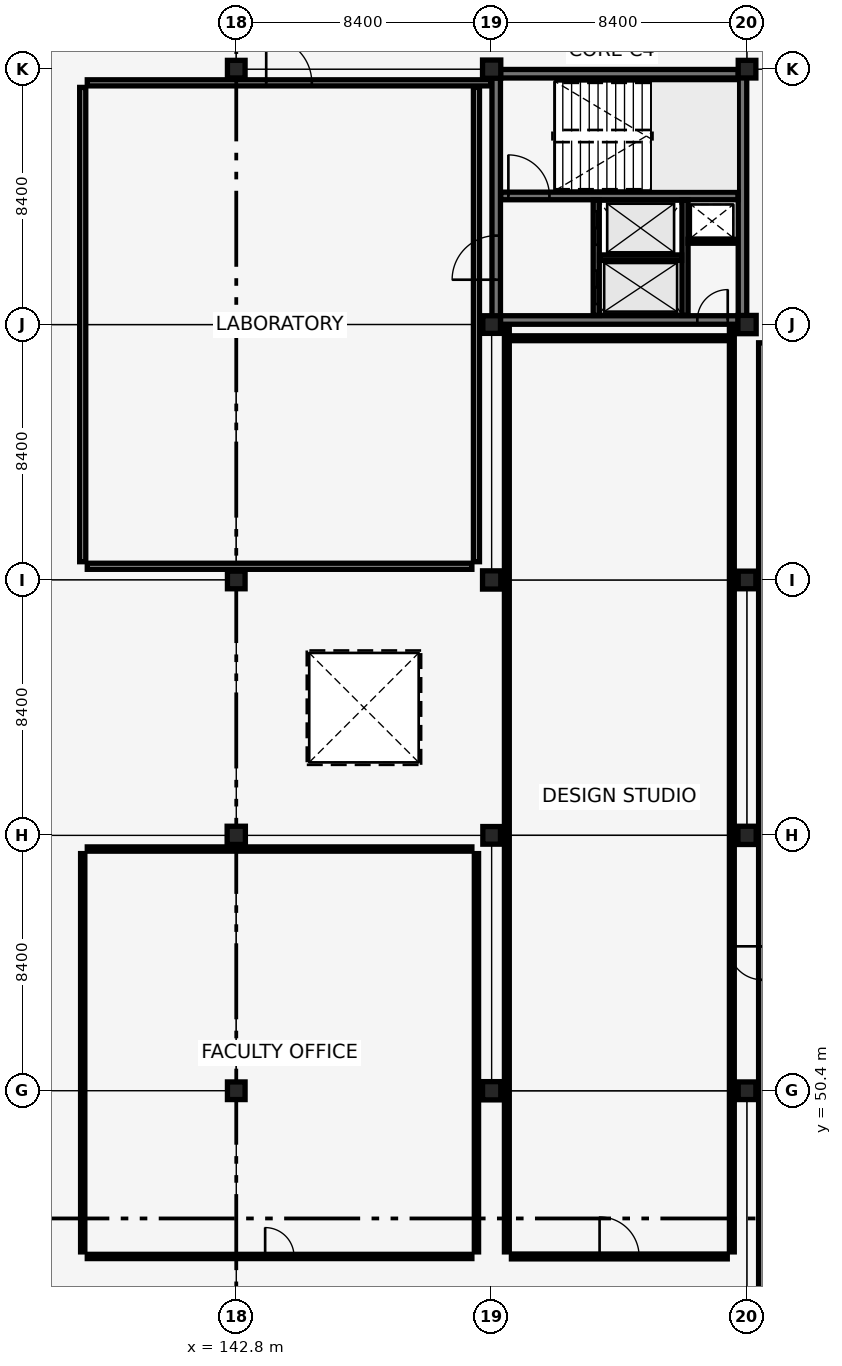
"""IFC4 building model, lengths in metres.
Left out: names, types, materials, properties, quantities, classifications, styles, units other than length and angle.
Written with IfcOpenShell. Run it as: python <this file> out.ifc"""

import sys

from ifc_helpers import new_model, si_unit, direction, frame, frame_2d, origin, origin_2d, place, context, subcontext, project, spatial, rectangle, extrude, element, fill, save


model = new_model("IFC4")
c1 = context("Model", 3, precision=1e-05, world=origin(), true_north=direction((0.0, 1.0)))
c2 = subcontext(c1, "Body", "Model", "MODEL_VIEW")
j1 = project(units=[si_unit("LENGTHUNIT", "METRE"), si_unit("PLANEANGLEUNIT", "RADIAN")], contexts=[c1])
p1 = place(None, origin())
s1 = spatial("IfcSite", under=j1, at=p1, CompositionType="ELEMENT")
p2 = place(p1, origin())
s2 = spatial("IfcBuilding", under=s1, at=p2, CompositionType="ELEMENT")
p3 = place(p2, frame((0.0, 0.0, 18.02)))
s3 = spatial("IfcBuildingStorey", under=s2, at=p3, CompositionType="ELEMENT", Elevation=18.02)
p4 = place(p3, frame((151.35, 75.75, 0.0), z_axis=(0.0, 0.0, 1.0), x_axis=(1.0, 0.0, 0.0)))
e1 = element("IfcWall", 1, at=p4, inside=s3, PredefinedType="SHEAR", context=c2, shape_type="SweptSolid", body=[
    extrude(rectangle(XDim=8.1, YDim=0.28, at=frame_2d((4.05, 0.0))), origin(), (0.0, 0.0, 1.0), 3.78),
])
p5 = place(p4, frame((6.615, 0.0, 0.0)))
e2 = element("IfcOpeningElement", 2, at=p5, cuts=e1, PredefinedType="OPENING", context=c2, shape_type="SweptSolid", body=[
    extrude(rectangle(XDim=1.0, YDim=2.15, at=frame_2d((0.5, 1.075))), frame((0.0, 0.15, 0.0), z_axis=(0.0, -1.0, 0.0), x_axis=(1.0, 0.0, 0.0)), (0.0, 0.0, 1.0), 0.3),
])
p6 = place(p3, frame((151.35, 83.85, 0.0), z_axis=(0.0, 0.0, 1.0), x_axis=(1.0, 0.0, 0.0)))
e3 = element("IfcWall", 3, at=p6, inside=s3, PredefinedType="SHEAR", context=c2, shape_type="SweptSolid", body=[
    extrude(rectangle(XDim=8.1, YDim=0.28, at=frame_2d((4.05, 0.0))), origin(), (0.0, 0.0, 1.0), 3.78),
])
p7 = place(p3, frame((151.35, 75.75, 0.0), z_axis=(0.0, 0.0, 1.0), x_axis=(0.0, 1.0, 0.0)))
e4 = element("IfcWall", 4, at=p7, inside=s3, PredefinedType="SHEAR", context=c2, shape_type="SweptSolid", body=[
    extrude(rectangle(XDim=8.1, YDim=0.28, at=frame_2d((4.05, 0.0))), origin(), (0.0, 0.0, 1.0), 3.78),
])
p8 = place(p7, frame((1.325, 0.0, 0.0)))
e5 = element("IfcOpeningElement", 5, at=p8, cuts=e4, PredefinedType="OPENING", context=c2, shape_type="SweptSolid", body=[
    extrude(rectangle(XDim=1.45, YDim=2.15, at=frame_2d((0.725, 1.075))), frame((0.0, 0.15, 0.0), z_axis=(0.0, -1.0, 0.0), x_axis=(1.0, 0.0, 0.0)), (0.0, 0.0, 1.0), 0.3),
])
p9 = place(p3, frame((159.45, 75.75, 0.0), z_axis=(0.0, 0.0, 1.0), x_axis=(0.0, 1.0, 0.0)))
e6 = element("IfcWall", 6, at=p9, inside=s3, PredefinedType="SHEAR", context=c2, shape_type="SweptSolid", body=[
    extrude(rectangle(XDim=8.1, YDim=0.28, at=frame_2d((4.05, 0.0))), origin(), (0.0, 0.0, 1.0), 3.78),
])
p10 = place(p3, frame((151.5, 79.83, 0.0), z_axis=(0.0, 0.0, 1.0), x_axis=(1.0, 0.0, 0.0)))
e7 = element("IfcWall", 7, at=p10, inside=s3, PredefinedType="SHEAR", context=c2, shape_type="SweptSolid", body=[
    extrude(rectangle(XDim=7.8, YDim=0.25, at=frame_2d((3.9, 0.0))), origin(), (0.0, 0.0, 1.0), 3.78),
])
p11 = place(p10, frame((0.25, 0.0, 0.0)))
e8 = element("IfcOpeningElement", 8, at=p11, cuts=e7, PredefinedType="OPENING", context=c2, shape_type="SweptSolid", body=[
    extrude(rectangle(XDim=1.35, YDim=2.15, at=frame_2d((0.675, 1.075))), frame((0.0, 0.135, 0.0), z_axis=(0.0, -1.0, 0.0), x_axis=(1.0, 0.0, 0.0)), (0.0, 0.0, 1.0), 0.27),
])
p12 = place(p3, frame((142.8, 50.4, 0.0), z_axis=(0.0, 0.0, 1.0), x_axis=(1.0, 0.0, 0.0)))
e9 = element("IfcColumn", 9, at=p12, inside=s3, PredefinedType="COLUMN", context=c2, shape_type="SweptSolid", body=[
    extrude(rectangle(XDim=0.58, YDim=0.58, at=origin_2d()), origin(), (0.0, 0.0, 1.0), 3.78),
])
p13 = place(p3, frame((142.8, 58.8, 0.0), z_axis=(0.0, 0.0, 1.0), x_axis=(1.0, 0.0, 0.0)))
e10 = element("IfcColumn", 10, at=p13, inside=s3, PredefinedType="COLUMN", context=c2, shape_type="SweptSolid", body=[
    extrude(rectangle(XDim=0.6, YDim=0.6, at=origin_2d()), origin(), (0.0, 0.0, 1.0), 3.78),
])
p14 = place(p3, frame((142.8, 67.2, 0.0), z_axis=(0.0, 0.0, 1.0), x_axis=(1.0, 0.0, 0.0)))
e11 = element("IfcColumn", 11, at=p14, inside=s3, PredefinedType="COLUMN", context=c2, shape_type="SweptSolid", body=[
    extrude(rectangle(XDim=0.58, YDim=0.58, at=origin_2d()), origin(), (0.0, 0.0, 1.0), 3.78),
])
p15 = place(p3, frame((142.8, 75.6, 0.0), z_axis=(0.0, 0.0, 1.0), x_axis=(1.0, 0.0, 0.0)))
e12 = element("IfcColumn", 12, at=p15, inside=s3, PredefinedType="COLUMN", context=c2, shape_type="SweptSolid", body=[
    extrude(rectangle(XDim=0.6, YDim=0.6, at=origin_2d()), origin(), (0.0, 0.0, 1.0), 3.78),
])
p16 = place(p3, frame((142.8, 84.0, 0.0), z_axis=(0.0, 0.0, 1.0), x_axis=(1.0, 0.0, 0.0)))
e13 = element("IfcColumn", 13, at=p16, inside=s3, PredefinedType="COLUMN", context=c2, shape_type="SweptSolid", body=[
    extrude(rectangle(XDim=0.58, YDim=0.58, at=origin_2d()), origin(), (0.0, 0.0, 1.0), 3.78),
])
p17 = place(p3, frame((151.2, 50.4, 0.0), z_axis=(0.0, 0.0, 1.0), x_axis=(1.0, 0.0, 0.0)))
e14 = element("IfcColumn", 14, at=p17, inside=s3, PredefinedType="COLUMN", context=c2, shape_type="SweptSolid", body=[
    extrude(rectangle(XDim=0.6, YDim=0.6, at=origin_2d()), origin(), (0.0, 0.0, 1.0), 3.78),
])
p18 = place(p3, frame((151.2, 58.8, 0.0), z_axis=(0.0, 0.0, 1.0), x_axis=(1.0, 0.0, 0.0)))
e15 = element("IfcColumn", 15, at=p18, inside=s3, PredefinedType="COLUMN", context=c2, shape_type="SweptSolid", body=[
    extrude(rectangle(XDim=0.58, YDim=0.58, at=origin_2d()), origin(), (0.0, 0.0, 1.0), 3.78),
])
p19 = place(p3, frame((151.2, 67.2, 0.0), z_axis=(0.0, 0.0, 1.0), x_axis=(1.0, 0.0, 0.0)))
e16 = element("IfcColumn", 16, at=p19, inside=s3, PredefinedType="COLUMN", context=c2, shape_type="SweptSolid", body=[
    extrude(rectangle(XDim=0.6, YDim=0.6, at=origin_2d()), origin(), (0.0, 0.0, 1.0), 3.78),
])
p20 = place(p3, frame((151.2, 75.6, 0.0), z_axis=(0.0, 0.0, 1.0), x_axis=(1.0, 0.0, 0.0)))
e17 = element("IfcColumn", 17, at=p20, inside=s3, PredefinedType="COLUMN", context=c2, shape_type="SweptSolid", body=[
    extrude(rectangle(XDim=0.58, YDim=0.58, at=origin_2d()), origin(), (0.0, 0.0, 1.0), 3.78),
])
p21 = place(p3, frame((151.2, 84.0, 0.0), z_axis=(0.0, 0.0, 1.0), x_axis=(1.0, 0.0, 0.0)))
e18 = element("IfcColumn", 18, at=p21, inside=s3, PredefinedType="COLUMN", context=c2, shape_type="SweptSolid", body=[
    extrude(rectangle(XDim=0.6, YDim=0.6, at=origin_2d()), origin(), (0.0, 0.0, 1.0), 3.78),
])
p22 = place(p3, frame((159.6, 50.4, 0.0), z_axis=(0.0, 0.0, 1.0), x_axis=(1.0, 0.0, 0.0)))
e19 = element("IfcColumn", 19, at=p22, inside=s3, PredefinedType="COLUMN", context=c2, shape_type="SweptSolid", body=[
    extrude(rectangle(XDim=0.58, YDim=0.58, at=origin_2d()), origin(), (0.0, 0.0, 1.0), 3.78),
])
p23 = place(p3, frame((159.6, 58.8, 0.0), z_axis=(0.0, 0.0, 1.0), x_axis=(1.0, 0.0, 0.0)))
e20 = element("IfcColumn", 20, at=p23, inside=s3, PredefinedType="COLUMN", context=c2, shape_type="SweptSolid", body=[
    extrude(rectangle(XDim=0.6, YDim=0.6, at=origin_2d()), origin(), (0.0, 0.0, 1.0), 3.78),
])
p24 = place(p3, frame((159.6, 67.2, 0.0), z_axis=(0.0, 0.0, 1.0), x_axis=(1.0, 0.0, 0.0)))
e21 = element("IfcColumn", 21, at=p24, inside=s3, PredefinedType="COLUMN", context=c2, shape_type="SweptSolid", body=[
    extrude(rectangle(XDim=0.58, YDim=0.58, at=origin_2d()), origin(), (0.0, 0.0, 1.0), 3.78),
])
p25 = place(p3, frame((159.6, 75.6, 0.0), z_axis=(0.0, 0.0, 1.0), x_axis=(1.0, 0.0, 0.0)))
e22 = element("IfcColumn", 22, at=p25, inside=s3, PredefinedType="COLUMN", context=c2, shape_type="SweptSolid", body=[
    extrude(rectangle(XDim=0.6, YDim=0.6, at=origin_2d()), origin(), (0.0, 0.0, 1.0), 3.78),
])
p26 = place(p3, frame((159.6, 84.0, 0.0), z_axis=(0.0, 0.0, 1.0), x_axis=(1.0, 0.0, 0.0)))
e23 = element("IfcColumn", 23, at=p26, inside=s3, PredefinedType="COLUMN", context=c2, shape_type="SweptSolid", body=[
    extrude(rectangle(XDim=0.58, YDim=0.58, at=origin_2d()), origin(), (0.0, 0.0, 1.0), 3.78),
])
p27 = place(p3, frame((154.64, 75.9, 0.0), z_axis=(0.0, 0.0, 1.0), x_axis=(0.0, 1.0, 0.0)))
e24 = element("IfcWall", 24, at=p27, inside=s3, PredefinedType="SHEAR", context=c2, shape_type="SweptSolid", body=[
    extrude(rectangle(XDim=3.8, YDim=0.2, at=frame_2d((1.9, 0.0))), origin(), (0.0, 0.0, 1.0), 3.78),
])
p28 = place(p27, frame((0.375, 0.0, 0.0)))
e25 = element("IfcOpeningElement", 25, at=p28, cuts=e24, PredefinedType="OPENING", context=c2, shape_type="SweptSolid", body=[
    extrude(rectangle(XDim=1.1, YDim=2.15, at=frame_2d((0.55, 1.075))), frame((0.0, 0.11, 0.0), z_axis=(0.0, -1.0, 0.0), x_axis=(1.0, 0.0, 0.0)), (0.0, 0.0, 1.0), 0.22),
])
p29 = place(p27, frame((2.325, 0.0, 0.0)))
e26 = element("IfcOpeningElement", 26, at=p29, cuts=e24, PredefinedType="OPENING", context=c2, shape_type="SweptSolid", body=[
    extrude(rectangle(XDim=1.1, YDim=2.15, at=frame_2d((0.55, 1.075))), frame((0.0, 0.11, 0.0), z_axis=(0.0, -1.0, 0.0), x_axis=(1.0, 0.0, 0.0)), (0.0, 0.0, 1.0), 0.22),
])
p30 = place(p3, frame((157.56, 75.9, 0.0), z_axis=(0.0, 0.0, 1.0), x_axis=(0.0, 1.0, 0.0)))
e27 = element("IfcWall", 27, at=p30, inside=s3, PredefinedType="SHEAR", context=c2, shape_type="SweptSolid", body=[
    extrude(rectangle(XDim=3.8, YDim=0.2, at=frame_2d((1.9, 0.0))), origin(), (0.0, 0.0, 1.0), 3.78),
])
p31 = place(p3, frame((154.75, 77.8, 0.0), z_axis=(0.0, 0.0, 1.0), x_axis=(1.0, 0.0, 0.0)))
e28 = element("IfcWall", 28, at=p31, inside=s3, PredefinedType="SHEAR", context=c2, shape_type="SweptSolid", body=[
    extrude(rectangle(XDim=2.7, YDim=0.18, at=frame_2d((1.35, 0.0))), origin(), (0.0, 0.0, 1.0), 3.78),
])
p32 = place(p3, frame((157.66, 78.34, 0.0), z_axis=(0.0, 0.0, 1.0), x_axis=(1.0, 0.0, 0.0)))
e29 = element("IfcWall", 29, at=p32, inside=s3, PredefinedType="PARTITIONING", context=c2, shape_type="SweptSolid", body=[
    extrude(rectangle(XDim=1.62, YDim=0.13, at=frame_2d((0.81, 0.0))), origin(), (0.0, 0.0, 1.0), 3.78),
])
p33 = place(p3, frame((160.1, 34.2, 0.0), z_axis=(0.0, 0.0, 1.0), x_axis=(0.0, 1.0, 0.0)))
e30 = element("IfcWall", 30, at=p33, inside=s3, PredefinedType="PARTITIONING", context=c2, shape_type="SweptSolid", body=[
    extrude(rectangle(XDim=40.8, YDim=0.24, at=frame_2d((20.4, 0.0))), origin(), (0.0, 0.0, 1.0), 3.08),
])
p34 = place(p33, frame((19.85, 0.0, 0.0)))
e31 = element("IfcOpeningElement", 31, at=p34, cuts=e30, PredefinedType="OPENING", context=c2, shape_type="SweptSolid", body=[
    extrude(rectangle(XDim=1.1, YDim=2.15, at=frame_2d((0.55, 1.075))), frame((0.0, 0.13, 0.0), z_axis=(0.0, -1.0, 0.0), x_axis=(1.0, 0.0, 0.0)), (0.0, 0.0, 1.0), 0.26),
])
p35 = place(p3, frame((137.9, 44.95, 0.0), z_axis=(0.0, 0.0, 1.0), x_axis=(1.0, 0.0, 0.0)))
e32 = element("IfcWall", 32, at=p35, inside=s3, PredefinedType="PARTITIONING", context=c2, shape_type="SweptSolid", body=[
    extrude(rectangle(XDim=12.65, YDim=0.14, at=frame_2d((6.325, 0.0))), origin(), (0.0, 0.0, 1.0), 3.38),
])
p36 = place(p35, frame((5.85, 0.0, 0.0)))
e33 = element("IfcOpeningElement", 33, at=p36, cuts=e32, PredefinedType="OPENING", context=c2, shape_type="SweptSolid", body=[
    extrude(rectangle(XDim=0.95, YDim=2.1, at=frame_2d((0.475, 1.05))), frame((0.0, 0.08, 0.0), z_axis=(0.0, -1.0, 0.0), x_axis=(1.0, 0.0, 0.0)), (0.0, 0.0, 1.0), 0.16),
])
p37 = place(p3, frame((137.75, 45.1, 0.0), z_axis=(0.0, 0.0, 1.0), x_axis=(0.0, 1.0, 0.0)))
e34 = element("IfcWall", 34, at=p37, inside=s3, PredefinedType="PARTITIONING", context=c2, shape_type="SweptSolid", body=[
    extrude(rectangle(XDim=13.1, YDim=0.14, at=frame_2d((6.55, 0.0))), origin(), (0.0, 0.0, 1.0), 3.08),
])
p38 = place(p3, frame((137.9, 58.35, 0.0), z_axis=(0.0, 0.0, 1.0), x_axis=(1.0, 0.0, 0.0)))
e35 = element("IfcWall", 35, at=p38, inside=s3, PredefinedType="PARTITIONING", context=c2, shape_type="SweptSolid", body=[
    extrude(rectangle(XDim=12.65, YDim=0.14, at=frame_2d((6.325, 0.0))), origin(), (0.0, 0.0, 1.0), 3.38),
])
p39 = place(p3, frame((150.7, 45.1, 0.0), z_axis=(0.0, 0.0, 1.0), x_axis=(0.0, 1.0, 0.0)))
e36 = element("IfcWall", 36, at=p39, inside=s3, PredefinedType="PARTITIONING", context=c2, shape_type="SweptSolid", body=[
    extrude(rectangle(XDim=13.1, YDim=0.14, at=frame_2d((6.55, 0.0))), origin(), (0.0, 0.0, 1.0), 3.08),
])
p40 = place(p3, frame((137.9, 83.55, 0.0), z_axis=(0.0, 0.0, 1.0), x_axis=(1.0, 0.0, 0.0)))
e37 = element("IfcWall", 37, at=p40, inside=s3, PredefinedType="PARTITIONING", context=c2, shape_type="SweptSolid", body=[
    extrude(rectangle(XDim=13.27, YDim=0.2, at=frame_2d((6.635, 0.0))), origin(), (0.0, 0.0, 1.0), 3.13),
])
p41 = place(p40, frame((5.885, 0.0, 0.0)))
e38 = element("IfcOpeningElement", 38, at=p41, cuts=e37, PredefinedType="OPENING", context=c2, shape_type="SweptSolid", body=[
    extrude(rectangle(XDim=1.5, YDim=2.2, at=frame_2d((0.75, 1.1))), frame((0.0, 0.11, 0.0), z_axis=(0.0, -1.0, 0.0), x_axis=(1.0, 0.0, 0.0)), (0.0, 0.0, 1.0), 0.22),
])
for number, where, z_axis, x_axis in (
    (39, (137.75, 67.8, 0.0), (0.0, 0.0, 1.0), (0.0, 1.0, 0.0)),
    (40, (150.7, 67.8, 0.0), (0.0, 0.0, 1.0), (0.0, 1.0, 0.0)),
):
    element("IfcWall", number, at=place(p3, frame(where, z_axis=z_axis, x_axis=x_axis)), inside=s3, PredefinedType="PARTITIONING", context=c2, shape_type="SweptSolid", body=[
        extrude(rectangle(XDim=15.6, YDim=0.2, at=frame_2d((7.8, 0.0))), origin(), (0.0, 0.0, 1.0), 3.16),
    ])
p42 = place(p3, frame((137.9, 67.65, 0.0), z_axis=(0.0, 0.0, 1.0), x_axis=(1.0, 0.0, 0.0)))
e41 = element("IfcWall", 41, at=p42, inside=s3, PredefinedType="PARTITIONING", context=c2, shape_type="SweptSolid", body=[
    extrude(rectangle(XDim=12.65, YDim=0.2, at=frame_2d((6.325, 0.0))), origin(), (0.0, 0.0, 1.0), 3.38),
])
p43 = place(p3, frame((151.85, 44.95, 0.0), z_axis=(0.0, 0.0, 1.0), x_axis=(1.0, 0.0, 0.0)))
e42 = element("IfcWall", 42, at=p43, inside=s3, PredefinedType="PARTITIONING", context=c2, shape_type="SweptSolid", body=[
    extrude(rectangle(XDim=7.1, YDim=0.16, at=frame_2d((3.55, 0.0))), origin(), (0.0, 0.0, 1.0), 3.78),
])
p44 = place(p43, frame((2.9, 0.0, 0.0)))
e43 = element("IfcOpeningElement", 43, at=p44, cuts=e42, PredefinedType="OPENING", context=c2, shape_type="SweptSolid", body=[
    extrude(rectangle(XDim=1.3, YDim=2.2, at=frame_2d((0.65, 1.1))), frame((0.0, 0.09, 0.0), z_axis=(0.0, -1.0, 0.0), x_axis=(1.0, 0.0, 0.0)), (0.0, 0.0, 1.0), 0.18),
])
p45 = place(p3, frame((151.85, 75.15, 0.0), z_axis=(0.0, 0.0, 1.0), x_axis=(1.0, 0.0, 0.0)))
e44 = element("IfcWall", 44, at=p45, inside=s3, PredefinedType="PARTITIONING", context=c2, shape_type="SweptSolid", body=[
    extrude(rectangle(XDim=7.1, YDim=0.16, at=frame_2d((3.55, 0.0))), origin(), (0.0, 0.0, 1.0), 3.78),
])
for number, where, z_axis, x_axis in (
    (45, (151.7, 45.1, 0.0), (0.0, 0.0, 1.0), (0.0, 1.0, 0.0)),
    (46, (159.1, 45.1, 0.0), (0.0, 0.0, 1.0), (0.0, 1.0, 0.0)),
):
    element("IfcWall", number, at=place(p3, frame(where, z_axis=z_axis, x_axis=x_axis)), inside=s3, PredefinedType="PARTITIONING", context=c2, shape_type="SweptSolid", body=[
        extrude(rectangle(XDim=30.47, YDim=0.16, at=frame_2d((15.235, 0.0))), origin(), (0.0, 0.0, 1.0), 3.08),
    ])
p46 = place(p11, origin())
e47 = element("IfcDoor", 47, at=p46, inside=s3, OperationType="SINGLE_SWING_LEFT", PredefinedType="DOOR", context=c2, shape_type="SweptSolid", body=[
    extrude(rectangle(XDim=1.35, YDim=2.15, at=frame_2d((0.675, 1.075))), frame((0.0, 0.025, 0.0), z_axis=(0.0, -1.0, 0.0), x_axis=(1.0, 0.0, 0.0)), (0.0, 0.0, 1.0), 0.05),
])
fill(e8, e47)
p47 = place(p28, origin())
e48 = element("IfcDoor", 48, at=p47, inside=s3, OperationType="SLIDING_TO_LEFT", PredefinedType="DOOR", context=c2, shape_type="SweptSolid", body=[
    extrude(rectangle(XDim=1.1, YDim=2.15, at=frame_2d((0.55, 1.075))), frame((0.0, 0.025, 0.0), z_axis=(0.0, -1.0, 0.0), x_axis=(1.0, 0.0, 0.0)), (0.0, 0.0, 1.0), 0.05),
])
fill(e25, e48)
p48 = place(p29, origin())
e49 = element("IfcDoor", 49, at=p48, inside=s3, OperationType="SLIDING_TO_LEFT", PredefinedType="DOOR", context=c2, shape_type="SweptSolid", body=[
    extrude(rectangle(XDim=1.1, YDim=2.15, at=frame_2d((0.55, 1.075))), frame((0.0, 0.025, 0.0), z_axis=(0.0, -1.0, 0.0), x_axis=(1.0, 0.0, 0.0)), (0.0, 0.0, 1.0), 0.05),
])
fill(e26, e49)
p49 = place(p8, origin())
e50 = element("IfcDoor", 50, at=p49, inside=s3, OperationType="DOUBLE_DOOR_SINGLE_SWING", PredefinedType="DOOR", context=c2, shape_type="SweptSolid", body=[
    extrude(rectangle(XDim=1.45, YDim=2.15, at=frame_2d((0.725, 1.075))), frame((0.0, 0.025, 0.0), z_axis=(0.0, -1.0, 0.0), x_axis=(1.0, 0.0, 0.0)), (0.0, 0.0, 1.0), 0.05),
])
fill(e5, e50)
p50 = place(p5, origin())
e51 = element("IfcDoor", 51, at=p50, inside=s3, OperationType="SINGLE_SWING_RIGHT", PredefinedType="DOOR", context=c2, shape_type="SweptSolid", body=[
    extrude(rectangle(XDim=1.0, YDim=2.15, at=frame_2d((0.5, 1.075))), frame((0.0, 0.025, 0.0), z_axis=(0.0, -1.0, 0.0), x_axis=(1.0, 0.0, 0.0)), (0.0, 0.0, 1.0), 0.05),
])
fill(e2, e51)
p51 = place(p34, origin())
e52 = element("IfcDoor", 52, at=p51, inside=s3, OperationType="SINGLE_SWING_RIGHT", PredefinedType="DOOR", context=c2, shape_type="SweptSolid", body=[
    extrude(rectangle(XDim=1.1, YDim=2.15, at=frame_2d((0.55, 1.075))), frame((0.0, 0.025, 0.0), z_axis=(0.0, -1.0, 0.0), x_axis=(1.0, 0.0, 0.0)), (0.0, 0.0, 1.0), 0.05),
])
fill(e31, e52)
p52 = place(p36, origin())
e53 = element("IfcDoor", 53, at=p52, inside=s3, OperationType="SINGLE_SWING_LEFT", PredefinedType="DOOR", context=c2, shape_type="SweptSolid", body=[
    extrude(rectangle(XDim=0.95, YDim=2.1, at=frame_2d((0.475, 1.05))), frame((0.0, 0.025, 0.0), z_axis=(0.0, -1.0, 0.0), x_axis=(1.0, 0.0, 0.0)), (0.0, 0.0, 1.0), 0.05),
])
fill(e33, e53)
p53 = place(p41, origin())
e54 = element("IfcDoor", 54, at=p53, inside=s3, OperationType="DOUBLE_DOOR_SINGLE_SWING", PredefinedType="DOOR", context=c2, shape_type="SweptSolid", body=[
    extrude(rectangle(XDim=1.5, YDim=2.2, at=frame_2d((0.75, 1.1))), frame((0.0, 0.025, 0.0), z_axis=(0.0, -1.0, 0.0), x_axis=(1.0, 0.0, 0.0)), (0.0, 0.0, 1.0), 0.05),
])
fill(e38, e54)
p54 = place(p44, origin())
e55 = element("IfcDoor", 55, at=p54, inside=s3, OperationType="SINGLE_SWING_LEFT", PredefinedType="DOOR", context=c2, shape_type="SweptSolid", body=[
    extrude(rectangle(XDim=1.3, YDim=2.2, at=frame_2d((0.65, 1.1))), frame((0.0, 0.025, 0.0), z_axis=(0.0, -1.0, 0.0), x_axis=(1.0, 0.0, 0.0)), (0.0, 0.0, 1.0), 0.05),
])
fill(e43, e55)
save(model, sys.argv[1])
